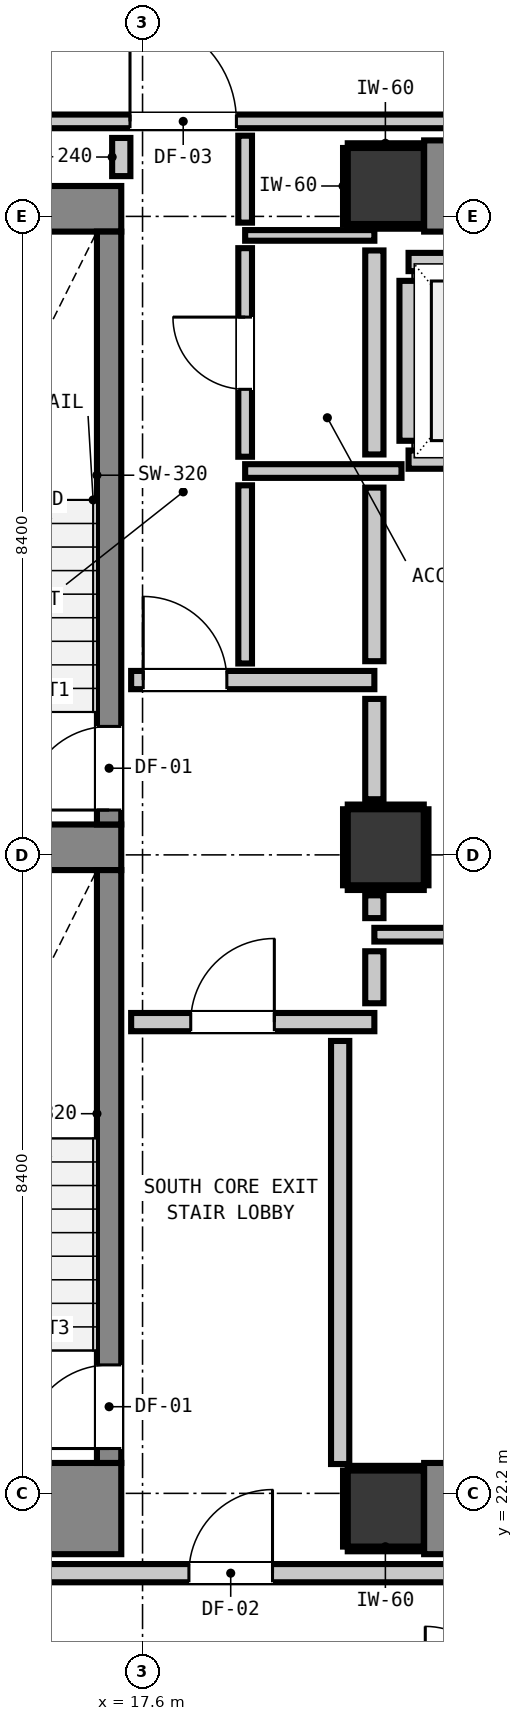
"""IFC4 building model, lengths in metres.
Left out: names, types, materials, properties, quantities, classifications, styles, units other than length and angle.
Written with IfcOpenShell. Run it as: python <this file> out.ifc"""

import sys

from ifc_helpers import new_model, si_unit, direction, frame, frame_2d, origin, origin_2d, place, context, subcontext, project, spatial, rectangle, extrude, element, fill, save


model = new_model("IFC4")
c1 = context("Model", 3, precision=1e-05, world=origin(), true_north=direction((0.0, 1.0)))
c2 = subcontext(c1, "Body", "Model", "MODEL_VIEW")
j1 = project(units=[si_unit("LENGTHUNIT", "METRE"), si_unit("PLANEANGLEUNIT", "RADIAN")], contexts=[c1])
p1 = place(None, origin())
s1 = spatial("IfcSite", under=j1, at=p1, CompositionType="ELEMENT")
p2 = place(p1, origin())
s2 = spatial("IfcBuilding", under=s1, at=p2, CompositionType="ELEMENT")
p3 = place(p2, frame((0.0, 0.0, 41.92)))
s3 = spatial("IfcBuildingStorey", under=s2, at=p3, CompositionType="ELEMENT", Elevation=41.92)
for number, where, z_axis, x_axis in (
    (1, (20.8, 22.0, 0.0), (0.0, 0.0, 1.0), (1.0, 0.0, 0.0)),
    (2, (20.8, 39.4, 0.0), (0.0, 0.0, 1.0), (1.0, 0.0, 0.0)),
):
    element("IfcColumn", number, at=place(p3, frame(where, z_axis=z_axis, x_axis=x_axis)), inside=s3, PredefinedType="COLUMN", context=c2, shape_type="SweptSolid", body=[
        extrude(rectangle(XDim=1.0, YDim=1.0, at=origin_2d()), origin(), (0.0, 0.0, 1.0), 3.32),
    ])
p4 = place(p3, frame((13.24, 22.0, 0.0), z_axis=(0.0, 0.0, 1.0), x_axis=(1.0, 0.0, 0.0)))
e3 = element("IfcWall", 3, at=p4, inside=s3, PredefinedType="SHEAR", context=c2, shape_type="SweptSolid", body=[
    extrude(rectangle(XDim=4.08, YDim=1.2, at=frame_2d((2.04, 0.0))), origin(), (0.0, 0.0, 1.0), 3.32),
])
p5 = place(p3, frame((13.24, 39.1, 0.0), z_axis=(0.0, 0.0, 1.0), x_axis=(1.0, 0.0, 0.0)))
e4 = element("IfcWall", 4, at=p5, inside=s3, PredefinedType="SHEAR", context=c2, shape_type="SweptSolid", body=[
    extrude(rectangle(XDim=4.08, YDim=0.6, at=frame_2d((2.04, 0.0))), origin(), (0.0, 0.0, 1.0), 3.32),
])
p6 = place(p3, frame((13.905, 30.7, 0.0), z_axis=(0.0, 0.0, 1.0), x_axis=(1.0, 0.0, 0.0)))
e5 = element("IfcWall", 5, at=p6, inside=s3, PredefinedType="SHEAR", context=c2, shape_type="SweptSolid", body=[
    extrude(rectangle(XDim=3.415, YDim=0.6, at=frame_2d((1.708, 0.0))), origin(), (0.0, 0.0, 1.0), 3.32),
])
for number, where, z_axis, x_axis in (
    (6, (21.305, 22.0, 0.0), (0.0, 0.0, 1.0), (1.0, 0.0, 0.0)),
    (7, (21.305, 39.4, 0.0), (0.0, 0.0, 1.0), (1.0, 0.0, 0.0)),
):
    element("IfcWall", number, at=place(p3, frame(where, z_axis=z_axis, x_axis=x_axis)), inside=s3, PredefinedType="SHEAR", context=c2, shape_type="SweptSolid", body=[
        extrude(rectangle(XDim=7.39, YDim=1.2, at=frame_2d((3.695, 0.0))), origin(), (0.0, 0.0, 1.0), 3.32),
    ])
p7 = place(p3, frame((17.16, 31.0, 0.0), z_axis=(0.0, 0.0, 1.0), x_axis=(0.0, 1.0, 0.0)))
e8 = element("IfcWall", 8, at=p7, inside=s3, PredefinedType="SHEAR", context=c2, shape_type="SweptSolid", body=[
    extrude(rectangle(XDim=7.8, YDim=0.32, at=frame_2d((3.9, 0.0))), origin(), (0.0, 0.0, 1.0), 3.32),
])
p8 = place(p7, frame((0.19, 0.0, 0.0)))
e9 = element("IfcOpeningElement", 9, at=p8, cuts=e8, PredefinedType="OPENING", context=c2, shape_type="SweptSolid", body=[
    extrude(rectangle(XDim=1.1, YDim=2.15, at=frame_2d((0.55, 1.075))), frame((0.0, 0.17, 0.0), z_axis=(0.0, -1.0, 0.0), x_axis=(1.0, 0.0, 0.0)), (0.0, 0.0, 1.0), 0.34),
])
p9 = place(p3, frame((17.16, 22.6, 0.0), z_axis=(0.0, 0.0, 1.0), x_axis=(0.0, 1.0, 0.0)))
e10 = element("IfcWall", 10, at=p9, inside=s3, PredefinedType="SHEAR", context=c2, shape_type="SweptSolid", body=[
    extrude(rectangle(XDim=7.8, YDim=0.32, at=frame_2d((3.9, 0.0))), origin(), (0.0, 0.0, 1.0), 3.32),
])
p10 = place(p9, frame((0.19, 0.0, 0.0)))
e11 = element("IfcOpeningElement", 11, at=p10, cuts=e10, PredefinedType="OPENING", context=c2, shape_type="SweptSolid", body=[
    extrude(rectangle(XDim=1.1, YDim=2.15, at=frame_2d((0.55, 1.075))), frame((0.0, 0.17, 0.0), z_axis=(0.0, -1.0, 0.0), x_axis=(1.0, 0.0, 0.0)), (0.0, 0.0, 1.0), 0.34),
])
p11 = place(p3, frame((20.8, 30.7, 0.0), z_axis=(0.0, 0.0, 1.0), x_axis=(1.0, 0.0, 0.0)))
e12 = element("IfcColumn", 12, at=p11, inside=s3, PredefinedType="COLUMN", context=c2, shape_type="SweptSolid", body=[
    extrude(rectangle(XDim=1.0, YDim=1.0, at=origin_2d()), origin(), (0.0, 0.0, 1.0), 3.32),
])
for number, where, z_axis, x_axis in (
    (13, (21.1, 35.8, 0.0), (0.0, 0.0, 1.0), (1.0, 0.0, 0.0)),
    (14, (21.1, 38.4, 0.0), (0.0, 0.0, 1.0), (1.0, 0.0, 0.0)),
):
    element("IfcWall", number, at=place(p3, frame(where, z_axis=z_axis, x_axis=x_axis)), inside=s3, PredefinedType="PARTITIONING", context=c2, shape_type="SweptSolid", body=[
        extrude(rectangle(XDim=2.2, YDim=0.24, at=frame_2d((1.1, 0.0))), origin(), (0.0, 0.0, 1.0), 3.06),
    ])
p12 = place(p3, frame((21.1, 36.048, 0.0), z_axis=(0.0, 0.0, 1.0), x_axis=(0.0, 1.0, 0.0)))
e15 = element("IfcWall", 15, at=p12, inside=s3, PredefinedType="PARTITIONING", context=c2, shape_type="SweptSolid", body=[
    extrude(rectangle(XDim=2.104, YDim=0.24, at=frame_2d((1.052, 0.0))), origin(), (0.0, 0.0, 1.0), 2.295),
])
p13 = place(p3, frame((10.15, 21.15, 0.0), z_axis=(0.0, 0.0, 1.0), x_axis=(1.0, 0.0, 0.0)))
e16 = element("IfcWall", 16, at=p13, inside=s3, PredefinedType="PARTITIONING", context=c2, shape_type="SweptSolid", body=[
    extrude(rectangle(XDim=40.023, YDim=0.24, at=frame_2d((20.012, 0.0))), origin(), (0.0, 0.0, 1.0), 3.06),
])
p14 = place(p13, frame((8.06, 0.0, 0.0)))
e17 = element("IfcOpeningElement", 17, at=p14, cuts=e16, PredefinedType="OPENING", context=c2, shape_type="SweptSolid", body=[
    extrude(rectangle(XDim=1.1, YDim=2.15, at=frame_2d((0.55, 1.075))), frame((0.0, 0.13, 0.0), z_axis=(0.0, -1.0, 0.0), x_axis=(1.0, 0.0, 0.0)), (0.0, 0.0, 1.0), 0.26),
])
p15 = place(p13, frame((0.324, 0.0, 0.0)))
e18 = element("IfcOpeningElement", 18, at=p15, cuts=e16, PredefinedType="OPENING", context=c2, shape_type="SweptSolid", body=[
    extrude(rectangle(XDim=1.4, YDim=2.15, at=frame_2d((0.7, 1.075))), frame((0.0, 0.13, 0.0), z_axis=(0.0, -1.0, 0.0), x_axis=(1.0, 0.0, 0.0)), (0.0, 0.0, 1.0), 0.26),
])
p16 = place(p13, frame((33.574, 0.0, 0.0)))
e19 = element("IfcOpeningElement", 19, at=p16, cuts=e16, PredefinedType="OPENING", context=c2, shape_type="SweptSolid", body=[
    extrude(rectangle(XDim=1.0, YDim=2.15, at=frame_2d((0.5, 1.075))), frame((0.0, 0.13, 0.0), z_axis=(0.0, -1.0, 0.0), x_axis=(1.0, 0.0, 0.0)), (0.0, 0.0, 1.0), 0.26),
])
p17 = place(p3, frame((17.45, 28.4, 0.0), z_axis=(0.0, 0.0, 1.0), x_axis=(1.0, 0.0, 0.0)))
e20 = element("IfcWall", 20, at=p17, inside=s3, PredefinedType="PARTITIONING", context=c2, shape_type="SweptSolid", body=[
    extrude(rectangle(XDim=3.2, YDim=0.24, at=frame_2d((1.6, 0.0))), origin(), (0.0, 0.0, 1.0), 3.06),
])
p18 = place(p17, frame((0.784, 0.0, 0.0)))
e21 = element("IfcOpeningElement", 21, at=p18, cuts=e20, PredefinedType="OPENING", context=c2, shape_type="SweptSolid", body=[
    extrude(rectangle(XDim=1.1, YDim=2.15, at=frame_2d((0.55, 1.075))), frame((0.0, 0.13, 0.0), z_axis=(0.0, -1.0, 0.0), x_axis=(1.0, 0.0, 0.0)), (0.0, 0.0, 1.0), 0.26),
])
p19 = place(p3, frame((17.45, 32.9, 0.0), z_axis=(0.0, 0.0, 1.0), x_axis=(1.0, 0.0, 0.0)))
e22 = element("IfcWall", 22, at=p19, inside=s3, PredefinedType="PARTITIONING", context=c2, shape_type="SweptSolid", body=[
    extrude(rectangle(XDim=3.2, YDim=0.24, at=frame_2d((1.6, 0.0))), origin(), (0.0, 0.0, 1.0), 3.06),
])
p20 = place(p19, frame((0.159, 0.0, 0.0)))
e23 = element("IfcOpeningElement", 23, at=p20, cuts=e22, PredefinedType="OPENING", context=c2, shape_type="SweptSolid", body=[
    extrude(rectangle(XDim=1.1, YDim=2.15, at=frame_2d((0.55, 1.075))), frame((0.0, 0.13, 0.0), z_axis=(0.0, -1.0, 0.0), x_axis=(1.0, 0.0, 0.0)), (0.0, 0.0, 1.0), 0.26),
])
p21 = place(p3, frame((20.65, 29.55, 0.0), z_axis=(0.0, 0.0, 1.0), x_axis=(1.0, 0.0, 0.0)))
e24 = element("IfcWall", 24, at=p21, inside=s3, PredefinedType="PARTITIONING", context=c2, shape_type="SweptSolid", body=[
    extrude(rectangle(XDim=9.325, YDim=0.18, at=frame_2d((4.663, 0.0))), origin(), (0.0, 0.0, 1.0), 3.06),
])
p22 = place(p3, frame((18.95, 35.65, 0.0), z_axis=(0.0, 0.0, 1.0), x_axis=(1.0, 0.0, 0.0)))
e25 = element("IfcWall", 25, at=p22, inside=s3, PredefinedType="PARTITIONING", context=c2, shape_type="SweptSolid", body=[
    extrude(rectangle(XDim=2.057, YDim=0.18, at=frame_2d((1.029, 0.0))), origin(), (0.0, 0.0, 1.0), 3.06),
])
p23 = place(p3, frame((10.15, 40.25, 0.0), z_axis=(0.0, 0.0, 1.0), x_axis=(1.0, 0.0, 0.0)))
e26 = element("IfcWall", 26, at=p23, inside=s3, PredefinedType="PARTITIONING", context=c2, shape_type="SweptSolid", body=[
    extrude(rectangle(XDim=26.782, YDim=0.18, at=frame_2d((13.391, 0.0))), origin(), (0.0, 0.0, 1.0), 3.06),
])
p24 = place(p23, frame((7.285, 0.0, 0.0)))
e27 = element("IfcOpeningElement", 27, at=p24, cuts=e26, PredefinedType="OPENING", context=c2, shape_type="SweptSolid", body=[
    extrude(rectangle(XDim=1.4, YDim=2.15, at=frame_2d((0.7, 1.075))), frame((0.0, 0.1, 0.0), z_axis=(0.0, -1.0, 0.0), x_axis=(1.0, 0.0, 0.0)), (0.0, 0.0, 1.0), 0.2),
])
p25 = place(p23, frame((0.324, 0.0, 0.0)))
e28 = element("IfcOpeningElement", 28, at=p25, cuts=e26, PredefinedType="OPENING", context=c2, shape_type="SweptSolid", body=[
    extrude(rectangle(XDim=1.4, YDim=2.15, at=frame_2d((0.7, 1.075))), frame((0.0, 0.1, 0.0), z_axis=(0.0, -1.0, 0.0), x_axis=(1.0, 0.0, 0.0)), (0.0, 0.0, 1.0), 0.2),
])
p26 = place(p3, frame((18.95, 38.75, 0.0), z_axis=(0.0, 0.0, 1.0), x_axis=(1.0, 0.0, 0.0)))
e29 = element("IfcWall", 29, at=p26, inside=s3, PredefinedType="PARTITIONING", context=c2, shape_type="SweptSolid", body=[
    extrude(rectangle(XDim=1.7, YDim=0.14, at=frame_2d((0.85, 0.0))), origin(), (0.0, 0.0, 1.0), 3.06),
])
p27 = place(p3, frame((17.32, 39.53, 0.0), z_axis=(0.0, 0.0, 1.0), x_axis=(0.0, 1.0, 0.0)))
e30 = element("IfcWall", 30, at=p27, inside=s3, PredefinedType="PARTITIONING", context=c2, shape_type="SweptSolid", body=[
    extrude(rectangle(XDim=0.502, YDim=0.24, at=frame_2d((0.251, 0.0))), origin(), (0.0, 0.0, 1.0), 3.06),
])
p28 = place(p3, frame((20.2, 22.586, 0.0), z_axis=(0.0, 0.0, 1.0), x_axis=(0.0, 1.0, 0.0)))
e31 = element("IfcWall", 31, at=p28, inside=s3, PredefinedType="PARTITIONING", context=c2, shape_type="SweptSolid", body=[
    extrude(rectangle(XDim=5.566, YDim=0.24, at=frame_2d((2.783, 0.0))), origin(), (0.0, 0.0, 1.0), 3.06),
])
p29 = place(p3, frame((20.65, 28.648, 0.0), z_axis=(0.0, 0.0, 1.0), x_axis=(0.0, 1.0, 0.0)))
e32 = element("IfcWall", 32, at=p29, inside=s3, PredefinedType="PARTITIONING", context=c2, shape_type="SweptSolid", body=[
    extrude(rectangle(XDim=0.684, YDim=0.24, at=frame_2d((0.342, 0.0))), origin(), (0.0, 0.0, 1.0), 2.295),
])
p30 = place(p3, frame((20.65, 29.768, 0.0), z_axis=(0.0, 0.0, 1.0), x_axis=(0.0, 1.0, 0.0)))
e33 = element("IfcWall", 33, at=p30, inside=s3, PredefinedType="PARTITIONING", context=c2, shape_type="SweptSolid", body=[
    extrude(rectangle(XDim=0.3, YDim=0.24, at=frame_2d((0.15, 0.0))), origin(), (0.0, 0.0, 1.0), 2.295),
])
p31 = place(p3, frame((20.65, 31.332, 0.0), z_axis=(0.0, 0.0, 1.0), x_axis=(0.0, 1.0, 0.0)))
e34 = element("IfcWall", 34, at=p31, inside=s3, PredefinedType="PARTITIONING", context=c2, shape_type="SweptSolid", body=[
    extrude(rectangle(XDim=1.32, YDim=0.24, at=frame_2d((0.66, 0.0))), origin(), (0.0, 0.0, 1.0), 2.295),
])
p32 = place(p3, frame((20.65, 33.148, 0.0), z_axis=(0.0, 0.0, 1.0), x_axis=(0.0, 1.0, 0.0)))
e35 = element("IfcWall", 35, at=p32, inside=s3, PredefinedType="PARTITIONING", context=c2, shape_type="SweptSolid", body=[
    extrude(rectangle(XDim=2.284, YDim=0.24, at=frame_2d((1.142, 0.0))), origin(), (0.0, 0.0, 1.0), 2.295),
])
p33 = place(p3, frame((20.65, 35.868, 0.0), z_axis=(0.0, 0.0, 1.0), x_axis=(0.0, 1.0, 0.0)))
e36 = element("IfcWall", 36, at=p33, inside=s3, PredefinedType="PARTITIONING", context=c2, shape_type="SweptSolid", body=[
    extrude(rectangle(XDim=2.684, YDim=0.24, at=frame_2d((1.342, 0.0))), origin(), (0.0, 0.0, 1.0), 2.295),
])
p34 = place(p3, frame((18.95, 33.118, 0.0), z_axis=(0.0, 0.0, 1.0), x_axis=(0.0, 1.0, 0.0)))
e37 = element("IfcWall", 37, at=p34, inside=s3, PredefinedType="PARTITIONING", context=c2, shape_type="SweptSolid", body=[
    extrude(rectangle(XDim=2.344, YDim=0.18, at=frame_2d((1.172, 0.0))), origin(), (0.0, 0.0, 1.0), 3.06),
])
p35 = place(p3, frame((18.95, 35.838, 0.0), z_axis=(0.0, 0.0, 1.0), x_axis=(0.0, 1.0, 0.0)))
e38 = element("IfcWall", 38, at=p35, inside=s3, PredefinedType="PARTITIONING", context=c2, shape_type="SweptSolid", body=[
    extrude(rectangle(XDim=2.744, YDim=0.18, at=frame_2d((1.372, 0.0))), origin(), (0.0, 0.0, 1.0), 3.06),
])
p36 = place(p35, frame((0.887, 0.0, 0.0)))
e39 = element("IfcOpeningElement", 39, at=p36, cuts=e38, PredefinedType="OPENING", context=c2, shape_type="SweptSolid", body=[
    extrude(rectangle(XDim=0.95, YDim=2.1, at=frame_2d((0.475, 1.05))), frame((0.0, 0.1, 0.0), z_axis=(0.0, -1.0, 0.0), x_axis=(1.0, 0.0, 0.0)), (0.0, 0.0, 1.0), 0.2),
])
p37 = place(p3, frame((18.95, 38.918, 0.0), z_axis=(0.0, 0.0, 1.0), x_axis=(0.0, 1.0, 0.0)))
e40 = element("IfcWall", 40, at=p37, inside=s3, PredefinedType="PARTITIONING", context=c2, shape_type="SweptSolid", body=[
    extrude(rectangle(XDim=1.144, YDim=0.18, at=frame_2d((0.572, 0.0))), origin(), (0.0, 0.0, 1.0), 3.06),
])
for number, where, z_axis, x_axis in (
    (41, (20.3, 21.468, 0.0), (0.0, 0.0, 1.0), (1.0, 0.0, 0.0)),
    (42, (20.3, 22.532, 0.0), (0.0, 0.0, 1.0), (1.0, 0.0, 0.0)),
):
    element("IfcWall", number, at=place(p3, frame(where, z_axis=z_axis, x_axis=x_axis)), inside=s3, PredefinedType="PARTITIONING", context=c2, shape_type="SweptSolid", body=[
        extrude(rectangle(XDim=0.99, YDim=0.06, at=frame_2d((0.495, 0.0))), origin(), (0.0, 0.0, 1.0), 1.45),
    ])
p38 = place(p3, frame((20.268, 21.5, 0.0), z_axis=(0.0, 0.0, 1.0), x_axis=(0.0, 1.0, 0.0)))
e43 = element("IfcWall", 43, at=p38, inside=s3, PredefinedType="PARTITIONING", context=c2, shape_type="SweptSolid", body=[
    extrude(rectangle(XDim=1.0, YDim=0.06, at=frame_2d((0.5, 0.0))), origin(), (0.0, 0.0, 1.0), 1.45),
])
for number, where, z_axis, x_axis in (
    (44, (20.3, 38.868, 0.0), (0.0, 0.0, 1.0), (1.0, 0.0, 0.0)),
    (45, (20.3, 39.932, 0.0), (0.0, 0.0, 1.0), (1.0, 0.0, 0.0)),
):
    element("IfcWall", number, at=place(p3, frame(where, z_axis=z_axis, x_axis=x_axis)), inside=s3, PredefinedType="PARTITIONING", context=c2, shape_type="SweptSolid", body=[
        extrude(rectangle(XDim=0.99, YDim=0.06, at=frame_2d((0.495, 0.0))), origin(), (0.0, 0.0, 1.0), 1.45),
    ])
for number, where, z_axis, x_axis in (
    (46, (20.268, 38.9, 0.0), (0.0, 0.0, 1.0), (0.0, 1.0, 0.0)),
    (47, (20.3, 30.168, 0.0), (0.0, 0.0, 1.0), (1.0, 0.0, 0.0)),
    (48, (20.3, 31.232, 0.0), (0.0, 0.0, 1.0), (1.0, 0.0, 0.0)),
    (49, (20.268, 30.2, 0.0), (0.0, 0.0, 1.0), (0.0, 1.0, 0.0)),
    (50, (21.332, 30.2, 0.0), (0.0, 0.0, 1.0), (0.0, 1.0, 0.0)),
):
    element("IfcWall", number, at=place(p3, frame(where, z_axis=z_axis, x_axis=x_axis)), inside=s3, PredefinedType="PARTITIONING", context=c2, shape_type="SweptSolid", body=[
        extrude(rectangle(XDim=1.0, YDim=0.06, at=frame_2d((0.5, 0.0))), origin(), (0.0, 0.0, 1.0), 1.45),
    ])
p39 = place(p8, origin())
e51 = element("IfcDoor", 51, at=p39, inside=s3, OperationType="SINGLE_SWING_LEFT", PredefinedType="DOOR", context=c2, shape_type="SweptSolid", body=[
    extrude(rectangle(XDim=1.1, YDim=2.15, at=frame_2d((0.55, 1.075))), frame((0.0, 0.025, 0.0), z_axis=(0.0, -1.0, 0.0), x_axis=(1.0, 0.0, 0.0)), (0.0, 0.0, 1.0), 0.05),
])
fill(e9, e51)
p40 = place(p10, origin())
e52 = element("IfcDoor", 52, at=p40, inside=s3, OperationType="SINGLE_SWING_LEFT", PredefinedType="DOOR", context=c2, shape_type="SweptSolid", body=[
    extrude(rectangle(XDim=1.1, YDim=2.15, at=frame_2d((0.55, 1.075))), frame((0.0, 0.025, 0.0), z_axis=(0.0, -1.0, 0.0), x_axis=(1.0, 0.0, 0.0)), (0.0, 0.0, 1.0), 0.05),
])
fill(e11, e52)
p41 = place(p18, origin())
e53 = element("IfcDoor", 53, at=p41, inside=s3, OperationType="SINGLE_SWING_RIGHT", PredefinedType="DOOR", context=c2, shape_type="SweptSolid", body=[
    extrude(rectangle(XDim=1.1, YDim=2.15, at=frame_2d((0.55, 1.075))), frame((0.0, 0.025, 0.0), z_axis=(0.0, -1.0, 0.0), x_axis=(1.0, 0.0, 0.0)), (0.0, 0.0, 1.0), 0.05),
])
fill(e21, e53)
p42 = place(p20, origin())
e54 = element("IfcDoor", 54, at=p42, inside=s3, OperationType="SINGLE_SWING_LEFT", PredefinedType="DOOR", context=c2, shape_type="SweptSolid", body=[
    extrude(rectangle(XDim=1.1, YDim=2.15, at=frame_2d((0.55, 1.075))), frame((0.0, 0.025, 0.0), z_axis=(0.0, -1.0, 0.0), x_axis=(1.0, 0.0, 0.0)), (0.0, 0.0, 1.0), 0.05),
])
fill(e23, e54)
p43 = place(p14, origin())
e55 = element("IfcDoor", 55, at=p43, inside=s3, OperationType="SINGLE_SWING_RIGHT", PredefinedType="DOOR", context=c2, shape_type="SweptSolid", body=[
    extrude(rectangle(XDim=1.1, YDim=2.15, at=frame_2d((0.55, 1.075))), frame((0.0, 0.025, 0.0), z_axis=(0.0, -1.0, 0.0), x_axis=(1.0, 0.0, 0.0)), (0.0, 0.0, 1.0), 0.05),
])
fill(e17, e55)
p44 = place(p24, origin())
e56 = element("IfcDoor", 56, at=p44, inside=s3, OperationType="SINGLE_SWING_LEFT", PredefinedType="DOOR", context=c2, shape_type="SweptSolid", body=[
    extrude(rectangle(XDim=1.4, YDim=2.15, at=frame_2d((0.7, 1.075))), frame((0.0, 0.025, 0.0), z_axis=(0.0, -1.0, 0.0), x_axis=(1.0, 0.0, 0.0)), (0.0, 0.0, 1.0), 0.05),
])
fill(e27, e56)
p45 = place(p36, origin())
e57 = element("IfcDoor", 57, at=p45, inside=s3, OperationType="SINGLE_SWING_RIGHT", PredefinedType="DOOR", context=c2, shape_type="SweptSolid", body=[
    extrude(rectangle(XDim=0.95, YDim=2.1, at=frame_2d((0.475, 1.05))), frame((0.0, 0.025, 0.0), z_axis=(0.0, -1.0, 0.0), x_axis=(1.0, 0.0, 0.0)), (0.0, 0.0, 1.0), 0.05),
])
fill(e39, e57)
save(model, sys.argv[1])
